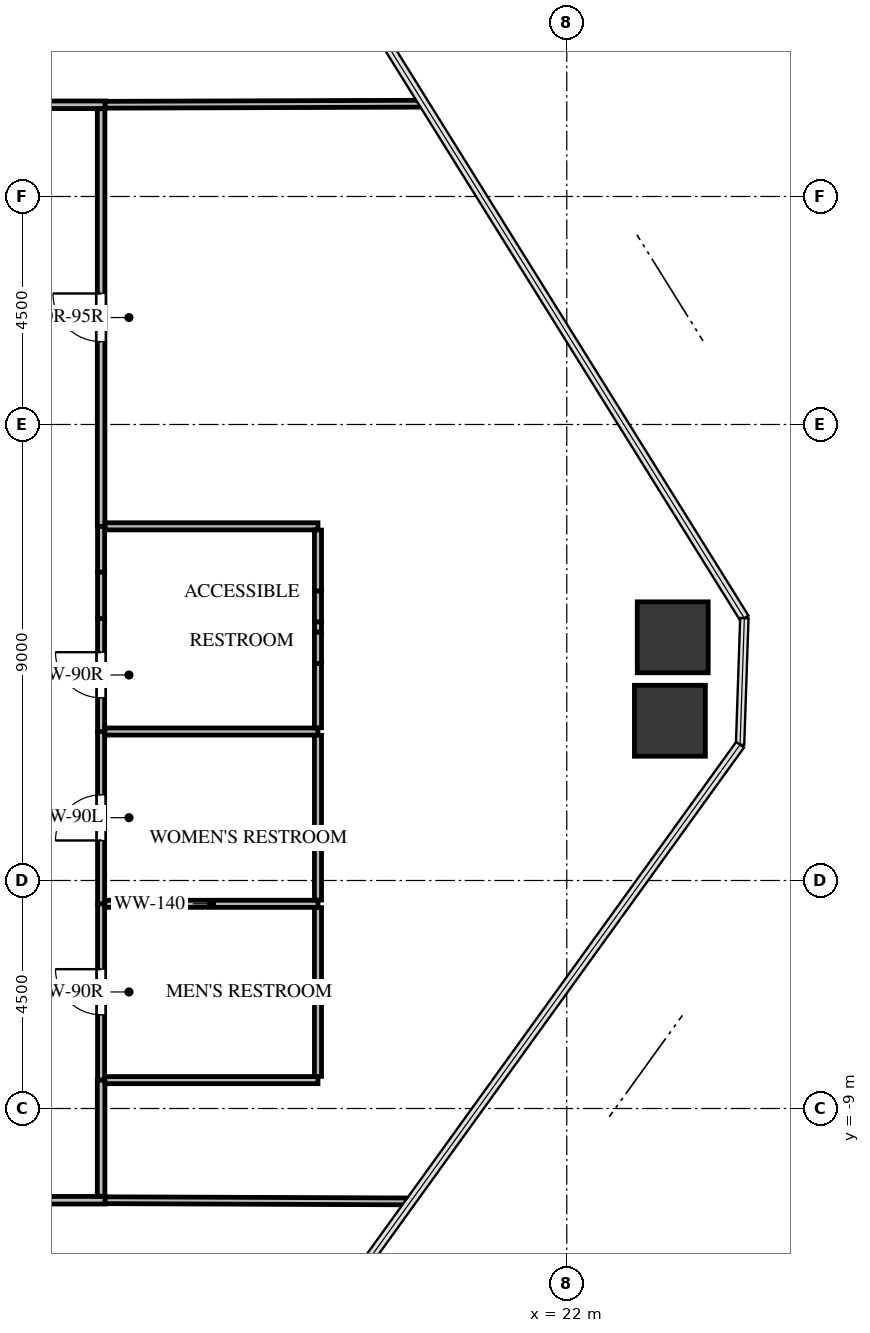
"""IFC4 building model, lengths in metres.
Left out: names, types, materials, properties, quantities, classifications, styles, units other than length and angle.
Written with IfcOpenShell. Run it as: python <this file> out.ifc"""

import sys

from ifc_helpers import new_model, si_unit, direction, frame, frame_2d, origin, origin_2d, place, context, subcontext, project, spatial, rectangle, extrude, source, transform, mapped, element, fill, save


model = new_model("IFC4")
c1 = context("Model", 3, precision=1e-05, world=origin(), true_north=direction((0.0, 1.0)))
c2 = subcontext(c1, "Body", "Model", "MODEL_VIEW")
j1 = project(units=[si_unit("LENGTHUNIT", "METRE"), si_unit("PLANEANGLEUNIT", "RADIAN")], contexts=[c1])
p1 = place(None, origin())
s1 = spatial("IfcSite", under=j1, at=p1, CompositionType="ELEMENT")
p2 = place(p1, origin())
s2 = spatial("IfcBuilding", under=s1, at=p2, CompositionType="ELEMENT")
p3 = place(p2, frame((0.0, 0.0, 48.9)))
s3 = spatial("IfcBuildingStorey", under=s2, at=p3, CompositionType="ELEMENT", Elevation=48.9)
m1 = source(origin(), c2, "Body", "SweptSolid", [
    extrude(rectangle(XDim=1.4, YDim=1.4, at=origin_2d()), origin(), (0.0, 0.0, 1.0), 3.3),
])
for number, where, z_axis, x_axis in (
    (1, (24.091, 0.3, -0.24), (0.0, 0.0, 1.0), (1.0, 0.0, 0.0)),
    (2, (24.035, -1.347, -0.24), (0.0, 0.0, 1.0), (1.0, 0.0, 0.0)),
):
    element("IfcColumn", number, at=place(p3, frame(where, z_axis=z_axis, x_axis=x_axis)), inside=s3, PredefinedType="COLUMN", context=c2, shape_type="MappedRepresentation", body=[
        mapped(m1, transform((0.0, 0.0, 0.0), x_axis=(1.0, 0.0, 0.0), y_axis=(0.0, 1.0, 0.0), z_axis=(0.0, 0.0, 1.0), scale=1.0)),
    ])
p4 = place(p3, frame((12.81, -8.44, 0.0), z_axis=(0.0, 0.0, 1.0), x_axis=(0.0, 1.0, 0.0)))
e3 = element("IfcWall", 3, at=p4, inside=s3, PredefinedType="PARTITIONING", context=c2, shape_type="SweptSolid", body=[
    extrude(rectangle(XDim=3.48, YDim=0.14, at=frame_2d((1.74, 0.0))), origin(), (0.0, 0.0, 1.0), 3.045),
])
p5 = place(p4, frame((1.29, 0.0, 0.0)))
e4 = element("IfcOpeningElement", 4, at=p5, cuts=e3, PredefinedType="OPENING", context=c2, shape_type="SweptSolid", body=[
    extrude(rectangle(XDim=0.9, YDim=2.05, at=frame_2d((0.45, 1.025))), frame((0.0, 0.08, 0.0), z_axis=(0.0, -1.0, 0.0), x_axis=(1.0, 0.0, 0.0)), (0.0, 0.0, 1.0), 0.16),
])
p6 = place(p3, frame((12.81, -4.96, 0.0), z_axis=(0.0, 0.0, 1.0), x_axis=(0.0, 1.0, 0.0)))
e5 = element("IfcWall", 5, at=p6, inside=s3, PredefinedType="PARTITIONING", context=c2, shape_type="SweptSolid", body=[
    extrude(rectangle(XDim=3.4, YDim=0.14, at=frame_2d((1.7, 0.0))), origin(), (0.0, 0.0, 1.0), 3.045),
])
p7 = place(p6, frame((1.25, 0.0, 0.0)))
e6 = element("IfcOpeningElement", 6, at=p7, cuts=e5, PredefinedType="OPENING", context=c2, shape_type="SweptSolid", body=[
    extrude(rectangle(XDim=0.9, YDim=2.05, at=frame_2d((0.45, 1.025))), frame((0.0, 0.08, 0.0), z_axis=(0.0, -1.0, 0.0), x_axis=(1.0, 0.0, 0.0)), (0.0, 0.0, 1.0), 0.16),
])
p8 = place(p3, frame((12.81, -1.56, 0.0), z_axis=(0.0, 0.0, 1.0), x_axis=(0.0, 1.0, 0.0)))
e7 = element("IfcWall", 7, at=p8, inside=s3, PredefinedType="PARTITIONING", context=c2, shape_type="SweptSolid", body=[
    extrude(rectangle(XDim=2.231, YDim=0.14, at=frame_2d((1.116, 0.0))), origin(), (0.0, 0.0, 1.0), 3.045),
])
p9 = place(p8, frame((0.666, 0.0, 0.0)))
e8 = element("IfcOpeningElement", 8, at=p9, cuts=e7, PredefinedType="OPENING", context=c2, shape_type="SweptSolid", body=[
    extrude(rectangle(XDim=0.9, YDim=2.05, at=frame_2d((0.45, 1.025))), frame((0.0, 0.08, 0.0), z_axis=(0.0, -1.0, 0.0), x_axis=(1.0, 0.0, 0.0)), (0.0, 0.0, 1.0), 0.16),
])
p10 = place(p3, frame((12.81, 1.585, 0.0), z_axis=(0.0, 0.0, 1.0), x_axis=(0.0, 1.0, 0.0)))
e9 = element("IfcWall", 9, at=p10, inside=s3, PredefinedType="PARTITIONING", context=c2, shape_type="SweptSolid", body=[
    extrude(rectangle(XDim=0.905, YDim=0.14, at=frame_2d((0.453, 0.0))), origin(), (0.0, 0.0, 1.0), 3.045),
])
p11 = place(p3, frame((12.81, 0.671, 0.0), z_axis=(0.0, 0.0, 1.0), x_axis=(0.0, 1.0, 0.0)))
e10 = element("IfcWall", 10, at=p11, inside=s3, PredefinedType="PARTITIONING", context=c2, shape_type="SweptSolid", body=[
    extrude(rectangle(XDim=0.914, YDim=0.14, at=frame_2d((0.457, 0.0))), origin(), (0.0, 0.0, 1.0), 2.13),
])
p12 = place(p3, frame((12.89, 10.81, 0.0), z_axis=(0.0, 0.0, 1.0), x_axis=(-1.0, 0.0, 0.0)))
e11 = element("IfcWall", 11, at=p12, inside=s3, PredefinedType="PARTITIONING", context=c2, shape_type="SweptSolid", body=[
    extrude(rectangle(XDim=1.847, YDim=0.15, at=frame_2d((0.924, 0.0))), origin(), (0.0, 0.0, 1.0), 3.045),
])
p13 = place(p3, frame((5.817, -10.81, 0.0), z_axis=(0.0, 0.0, 1.0), x_axis=(1.0, 0.0, 0.0)))
e12 = element("IfcWall", 12, at=p13, inside=s3, PredefinedType="PARTITIONING", context=c2, shape_type="SweptSolid", body=[
    extrude(rectangle(XDim=7.073, YDim=0.15, at=frame_2d((3.536, 0.0))), origin(), (0.0, 0.0, 1.0), 2.13),
])
p14 = place(p13, frame((3.086, 0.0, 0.0)))
e13 = element("IfcOpeningElement", 13, at=p14, cuts=e12, PredefinedType="OPENING", context=c2, shape_type="SweptSolid", body=[
    extrude(rectangle(XDim=0.9, YDim=2.05, at=frame_2d((0.45, 1.025))), frame((0.0, 0.085, 0.0), z_axis=(0.0, -1.0, 0.0), x_axis=(1.0, 0.0, 0.0)), (0.0, 0.0, 1.0), 0.17),
])
p15 = place(p3, frame((12.81, 2.49, 0.0), z_axis=(0.0, 0.0, 1.0), x_axis=(0.0, 1.0, 0.0)))
e14 = element("IfcWall", 14, at=p15, inside=s3, PredefinedType="PARTITIONING", context=c2, shape_type="SweptSolid", body=[
    extrude(rectangle(XDim=8.241, YDim=0.15, at=frame_2d((4.121, 0.0))), origin(), (0.0, 0.0, 1.0), 3.045),
])
p16 = place(p15, frame((3.646, 0.0, 0.0)))
e15 = element("IfcOpeningElement", 15, at=p16, cuts=e14, PredefinedType="OPENING", context=c2, shape_type="SweptSolid", body=[
    extrude(rectangle(XDim=0.95, YDim=2.1, at=frame_2d((0.475, 1.05))), frame((0.0, 0.085, 0.0), z_axis=(0.0, -1.0, 0.0), x_axis=(1.0, 0.0, 0.0)), (0.0, 0.0, 1.0), 0.17),
])
p17 = place(p3, frame((12.81, -10.731, 0.0), z_axis=(0.0, 0.0, 1.0), x_axis=(0.0, 1.0, 0.0)))
e16 = element("IfcWall", 16, at=p17, inside=s3, PredefinedType="PARTITIONING", context=c2, shape_type="SweptSolid", body=[
    extrude(rectangle(XDim=2.291, YDim=0.15, at=frame_2d((1.146, 0.0))), origin(), (0.0, 0.0, 1.0), 3.045),
])
p18 = place(p3, frame((12.884, -4.96, 0.0), z_axis=(0.0, 0.0, 1.0), x_axis=(1.0, 0.0, 0.0)))
e17 = element("IfcWall", 17, at=p18, inside=s3, PredefinedType="PARTITIONING", context=c2, shape_type="SweptSolid", body=[
    extrude(rectangle(XDim=4.206, YDim=0.14, at=frame_2d((2.103, 0.0))), origin(), (0.0, 0.0, 1.0), 3.045),
])
p19 = place(p3, frame((17.09, -8.44, 0.0), z_axis=(0.0, 0.0, 1.0), x_axis=(-1.0, 0.0, 0.0)))
e18 = element("IfcWall", 18, at=p19, inside=s3, PredefinedType="PARTITIONING", context=c2, shape_type="SweptSolid", body=[
    extrude(rectangle(XDim=4.201, YDim=0.14, at=frame_2d((2.101, 0.0))), origin(), (0.0, 0.0, 1.0), 3.045),
])
p20 = place(p3, frame((17.09, -5.034, 0.0), z_axis=(0.0, 0.0, 1.0), x_axis=(0.0, -1.0, 0.0)))
e19 = element("IfcWall", 19, at=p20, inside=s3, PredefinedType="PARTITIONING", context=c2, shape_type="SweptSolid", body=[
    extrude(rectangle(XDim=3.332, YDim=0.14, at=frame_2d((1.666, 0.0))), origin(), (0.0, 0.0, 1.0), 3.045),
])
p21 = place(p3, frame((12.884, -1.56, 0.0), z_axis=(0.0, 0.0, 1.0), x_axis=(1.0, 0.0, 0.0)))
e20 = element("IfcWall", 20, at=p21, inside=s3, PredefinedType="PARTITIONING", context=c2, shape_type="SweptSolid", body=[
    extrude(rectangle(XDim=4.206, YDim=0.14, at=frame_2d((2.103, 0.0))), origin(), (0.0, 0.0, 1.0), 3.045),
])
p22 = place(p3, frame((17.09, -1.634, 0.0), z_axis=(0.0, 0.0, 1.0), x_axis=(0.0, -1.0, 0.0)))
e21 = element("IfcWall", 21, at=p22, inside=s3, PredefinedType="PARTITIONING", context=c2, shape_type="SweptSolid", body=[
    extrude(rectangle(XDim=3.252, YDim=0.14, at=frame_2d((1.626, 0.0))), origin(), (0.0, 0.0, 1.0), 3.045),
])
p23 = place(p3, frame((12.889, 2.49, 0.0), z_axis=(0.0, 0.0, 1.0), x_axis=(1.0, 0.0, 0.0)))
e22 = element("IfcWall", 22, at=p23, inside=s3, PredefinedType="PARTITIONING", context=c2, shape_type="SweptSolid", body=[
    extrude(rectangle(XDim=4.201, YDim=0.14, at=frame_2d((2.101, 0.0))), origin(), (0.0, 0.0, 1.0), 3.045),
])
p24 = place(p3, frame((17.09, 2.416, 0.0), z_axis=(0.0, 0.0, 1.0), x_axis=(0.0, -1.0, 0.0)))
e23 = element("IfcWall", 23, at=p24, inside=s3, PredefinedType="PARTITIONING", context=c2, shape_type="SweptSolid", body=[
    extrude(rectangle(XDim=1.204, YDim=0.14, at=frame_2d((0.602, 0.0))), origin(), (0.0, 0.0, 1.0), 3.045),
])
p25 = place(p3, frame((17.09, 0.606, 0.0), z_axis=(0.0, 0.0, 1.0), x_axis=(0.0, -1.0, 0.0)))
e24 = element("IfcWall", 24, at=p25, inside=s3, PredefinedType="PARTITIONING", context=c2, shape_type="SweptSolid", body=[
    extrude(rectangle(XDim=0.205, YDim=0.14, at=frame_2d((0.103, 0.0))), origin(), (0.0, 0.0, 1.0), 3.045),
])
p26 = place(p3, frame((17.09, -0.216, 0.0), z_axis=(0.0, 0.0, 1.0), x_axis=(0.0, -1.0, 0.0)))
e25 = element("IfcWall", 25, at=p26, inside=s3, PredefinedType="PARTITIONING", context=c2, shape_type="SweptSolid", body=[
    extrude(rectangle(XDim=1.27, YDim=0.14, at=frame_2d((0.635, 0.0))), origin(), (0.0, 0.0, 1.0), 3.045),
])
p27 = place(p3, frame((17.09, 1.212, 0.0), z_axis=(0.0, 0.0, 1.0), x_axis=(0.0, -1.0, 0.0)))
e26 = element("IfcWall", 26, at=p27, inside=s3, PredefinedType="PARTITIONING", context=c2, shape_type="SweptSolid", body=[
    extrude(rectangle(XDim=0.606, YDim=0.14, at=frame_2d((0.303, 0.0))), origin(), (0.0, 0.0, 1.0), 2.13),
])
p28 = place(p3, frame((17.09, 0.401, 0.0), z_axis=(0.0, 0.0, 1.0), x_axis=(0.0, -1.0, 0.0)))
e27 = element("IfcWall", 27, at=p28, inside=s3, PredefinedType="PARTITIONING", context=c2, shape_type="SweptSolid", body=[
    extrude(rectangle(XDim=0.617, YDim=0.14, at=frame_2d((0.309, 0.0))), origin(), (0.0, 0.0, 1.0), 2.13),
])
p29 = place(p3, frame((19.182, 10.831, 0.0), z_axis=(0.0, 0.0, 1.0), x_axis=(-0.999994432845, -0.003336806783, 0.0)))
e28 = element("IfcWall", 28, at=p29, inside=s3, PredefinedType="PARTITIONING", context=c2, shape_type="SweptSolid", body=[
    extrude(rectangle(XDim=6.292, YDim=0.135, at=frame_2d((3.146, 0.0))), origin(), (0.0, 0.0, 1.0), 2.38),
])
p30 = place(p3, frame((12.89, -10.81, 0.0), z_axis=(0.0, 0.0, 1.0), x_axis=(0.999992607823, -0.003845035728, 0.0)))
e29 = element("IfcWall", 29, at=p30, inside=s3, PredefinedType="PARTITIONING", context=c2, shape_type="SweptSolid", body=[
    extrude(rectangle(XDim=6.032, YDim=0.135, at=frame_2d((3.016, 0.0))), origin(), (0.0, 0.0, 1.0), 2.38),
])
m2 = source(origin(), c2, "Body", "SweptSolid", [
    extrude(rectangle(XDim=0.9, YDim=2.05, at=frame_2d((0.45, 1.025))), frame((0.0, 0.025, 0.0), z_axis=(0.0, -1.0, 0.0), x_axis=(1.0, 0.0, 0.0)), (0.0, 0.0, 1.0), 0.05),
])
p31 = place(p5, origin())
e30 = element("IfcDoor", 30, at=p31, inside=s3, OperationType="SINGLE_SWING_RIGHT", PredefinedType="DOOR", context=c2, shape_type="MappedRepresentation", body=[
    mapped(m2, transform((0.0, 0.0, 0.0), x_axis=(1.0, 0.0, 0.0), y_axis=(0.0, 1.0, 0.0), z_axis=(0.0, 0.0, 1.0), scale=1.0)),
])
fill(e4, e30)
m3 = source(origin(), c2, "Body", "SweptSolid", [
    extrude(rectangle(XDim=0.9, YDim=2.05, at=frame_2d((0.45, 1.025))), frame((0.0, 0.025, 0.0), z_axis=(0.0, -1.0, 0.0), x_axis=(1.0, 0.0, 0.0)), (0.0, 0.0, 1.0), 0.05),
])
p32 = place(p7, origin())
e31 = element("IfcDoor", 31, at=p32, inside=s3, OperationType="SINGLE_SWING_LEFT", PredefinedType="DOOR", context=c2, shape_type="MappedRepresentation", body=[
    mapped(m3, transform((0.0, 0.0, 0.0), x_axis=(1.0, 0.0, 0.0), y_axis=(0.0, 1.0, 0.0), z_axis=(0.0, 0.0, 1.0), scale=1.0)),
])
fill(e6, e31)
p33 = place(p9, origin())
e32 = element("IfcDoor", 32, at=p33, inside=s3, OperationType="SINGLE_SWING_RIGHT", PredefinedType="DOOR", context=c2, shape_type="MappedRepresentation", body=[
    mapped(m2, transform((0.0, 0.0, 0.0), x_axis=(1.0, 0.0, 0.0), y_axis=(0.0, 1.0, 0.0), z_axis=(0.0, 0.0, 1.0), scale=1.0)),
])
fill(e8, e32)
m4 = source(origin(), c2, "Body", "SweptSolid", [
    extrude(rectangle(XDim=0.95, YDim=2.1, at=frame_2d((0.475, 1.05))), frame((0.0, 0.025, 0.0), z_axis=(0.0, -1.0, 0.0), x_axis=(1.0, 0.0, 0.0)), (0.0, 0.0, 1.0), 0.05),
])
p34 = place(p16, origin())
e33 = element("IfcDoor", 33, at=p34, inside=s3, OperationType="SINGLE_SWING_RIGHT", PredefinedType="DOOR", context=c2, shape_type="MappedRepresentation", body=[
    mapped(m4, transform((0.0, 0.0, 0.0), x_axis=(1.0, 0.0, 0.0), y_axis=(0.0, 1.0, 0.0), z_axis=(0.0, 0.0, 1.0), scale=1.0)),
])
fill(e15, e33)
save(model, sys.argv[1])
